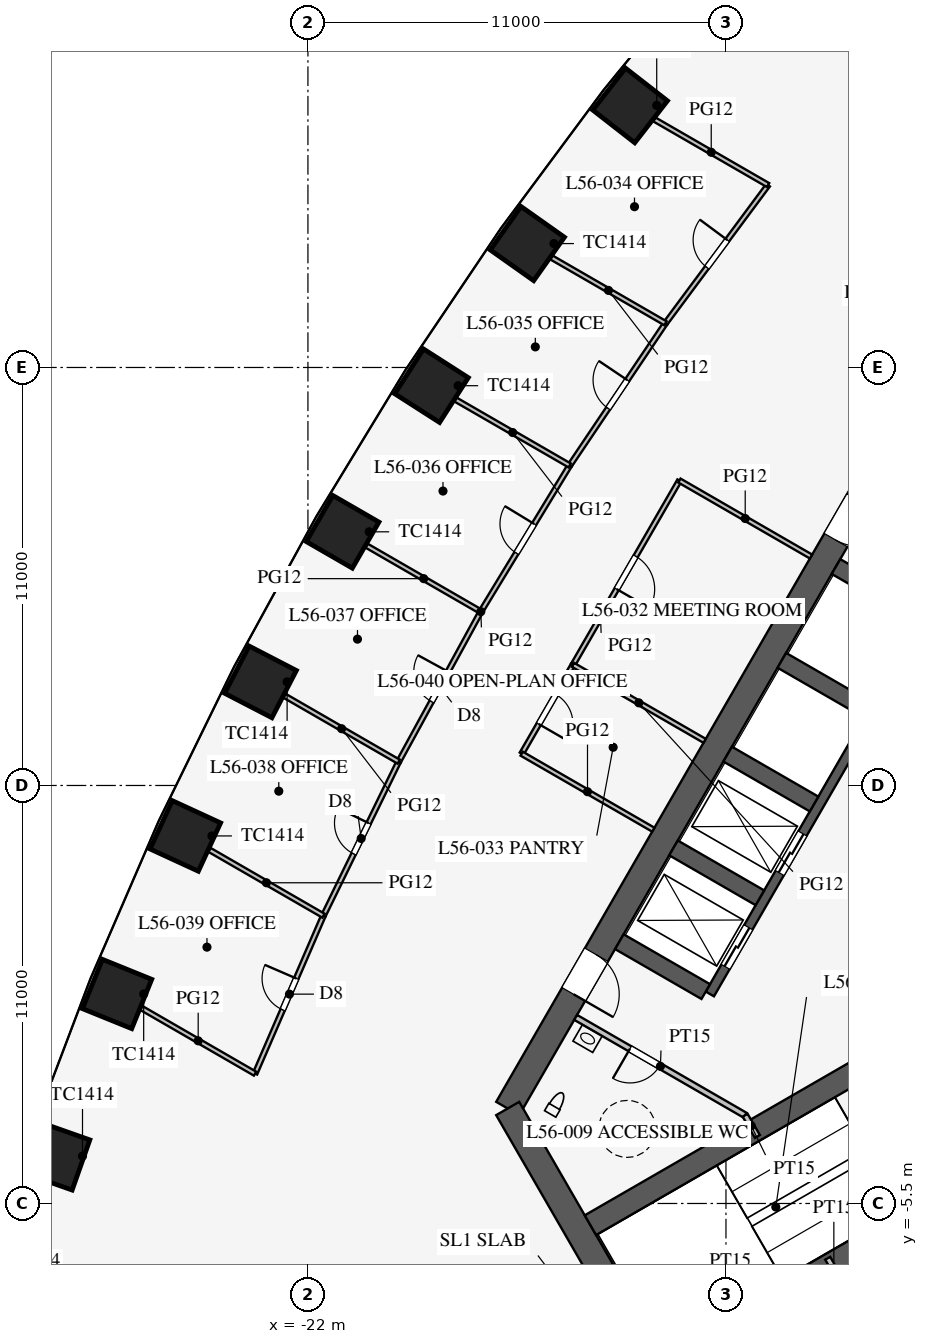
"""IFC4 building model, lengths in metres.
Left out: names, types, materials, properties, quantities, classifications, styles, units other than length and angle.
Written with IfcOpenShell. Run it as: python <this file> out.ifc"""

import sys

from ifc_helpers import new_model, si_unit, direction, frame, frame_2d, origin, origin_2d, place, context, subcontext, project, spatial, rectangle, extrude, element, fill, save


model = new_model("IFC4")
c1 = context("Model", 3, precision=1e-05, world=origin(), true_north=direction((0.0, 1.0)))
c2 = subcontext(c1, "Body", "Model", "MODEL_VIEW")
j1 = project(units=[si_unit("LENGTHUNIT", "METRE"), si_unit("PLANEANGLEUNIT", "RADIAN")], contexts=[c1])
p1 = place(None, origin())
s1 = spatial("IfcSite", under=j1, at=p1, CompositionType="ELEMENT")
p2 = place(p1, origin())
s2 = spatial("IfcBuilding", under=s1, at=p2, CompositionType="ELEMENT")
p3 = place(p2, frame((0.0, 0.0, 244.3)))
s3 = spatial("IfcBuildingStorey", under=s2, at=p3, CompositionType="ELEMENT", Elevation=244.3)
for number, where, z_axis, x_axis in (
    (1, (-13.522, 23.396, 0.0), (0.0, 0.0, 1.0), (-0.615, -0.789, 0.0)),
    (2, (-16.227, 19.761, 0.0), (0.0, 0.0, 1.0), (-0.577, -0.816, 0.0)),
    (3, (-18.748, 16.02, 0.0), (0.0, 0.0, 1.0), (-0.539, -0.842, 0.0)),
    (4, (-21.088, 12.175, 0.0), (0.0, 0.0, 1.0), (-0.5, -0.866, 0.0)),
    (5, (-23.248, 8.226, 0.0), (0.0, 0.0, 1.0), (-0.46, -0.888, 0.0)),
    (6, (-25.227, 4.172, 0.0), (0.0, 0.0, 1.0), (-0.418, -0.908, 0.0)),
    (7, (-27.022, 0.013, 0.0), (0.0, 0.0, 1.0), (-0.376, -0.927, 0.0)),
    (8, (-28.632, -4.254, 0.0), (0.0, 0.0, 1.0), (-0.332, -0.943, 0.0)),
):
    element("IfcColumn", number, at=place(p3, frame(where, z_axis=z_axis, x_axis=x_axis)), inside=s3, PredefinedType="COLUMN", context=c2, shape_type="SweptSolid", body=[
        extrude(rectangle(XDim=1.4, YDim=1.4, at=origin_2d()), origin(), (0.0, 0.0, 1.0), 4.2),
    ])
p4 = place(p3, frame((-5.773, 16.0, 0.0), z_axis=(0.0, 0.0, 1.0), x_axis=(-0.500002442456, -0.866023993627, 0.0)))
e9 = element("IfcWall", 9, at=p4, inside=s3, PredefinedType="SHEAR", context=c2, shape_type="SweptSolid", body=[
    extrude(rectangle(XDim=21.939, YDim=0.7, at=frame_2d((10.97, 0.0))), origin(), (0.0, 0.0, 1.0), 4.2),
])
p5 = place(p4, frame((17.27, 0.0, 0.0)))
e10 = element("IfcOpeningElement", 10, at=p5, cuts=e9, PredefinedType="OPENING", context=c2, shape_type="SweptSolid", body=[
    extrude(rectangle(XDim=1.2, YDim=2.1, at=frame_2d((0.6, 1.05))), frame((0.0, 0.36, 0.0), z_axis=(0.0, -1.0, 0.0), x_axis=(1.0, 0.0, 0.0)), (0.0, 0.0, 1.0), 0.72),
])
p6 = place(p4, frame((3.47, 0.0, 0.0)))
e11 = element("IfcOpeningElement", 11, at=p6, cuts=e9, PredefinedType="OPENING", context=c2, shape_type="SweptSolid", body=[
    extrude(rectangle(XDim=1.2, YDim=2.1, at=frame_2d((0.6, 1.05))), frame((0.0, 0.36, 0.0), z_axis=(0.0, -1.0, 0.0), x_axis=(1.0, 0.0, 0.0)), (0.0, 0.0, 1.0), 0.72),
])
p7 = place(p3, frame((-16.743, -3.0, 0.0), z_axis=(0.0, 0.0, 1.0), x_axis=(0.499995765644, -0.866027848477, 0.0)))
e12 = element("IfcWall", 12, at=p7, inside=s3, PredefinedType="SHEAR", context=c2, shape_type="SweptSolid", body=[
    extrude(rectangle(XDim=11.547, YDim=0.7, at=frame_2d((5.773, 0.0))), origin(), (0.0, 0.0, 1.0), 4.2),
])
p8 = place(p3, frame((-5.724, 9.886, 0.0), z_axis=(0.0, 0.0, 1.0), x_axis=(-0.500001763848, -0.866024385424, 0.0)))
e13 = element("IfcWall", 13, at=p8, inside=s3, PredefinedType="SHEAR", context=c2, shape_type="SweptSolid", body=[
    extrude(rectangle(XDim=11.4, YDim=0.25, at=frame_2d((5.7, 0.0))), origin(), (0.0, 0.0, 1.0), 4.2),
])
p9 = place(p8, frame((6.525, 0.0, 0.0)))
e14 = element("IfcOpeningElement", 14, at=p9, cuts=e13, PredefinedType="OPENING", context=c2, shape_type="SweptSolid", body=[
    extrude(rectangle(XDim=1.2, YDim=2.2, at=frame_2d((0.6, 1.1))), frame((0.0, 0.135, 0.0), z_axis=(0.0, -1.0, 0.0), x_axis=(1.0, 0.0, 0.0)), (0.0, 0.0, 1.0), 0.27),
])
p10 = place(p8, frame((9.375, 0.0, 0.0)))
e15 = element("IfcOpeningElement", 15, at=p10, cuts=e13, PredefinedType="OPENING", context=c2, shape_type="SweptSolid", body=[
    extrude(rectangle(XDim=1.2, YDim=2.2, at=frame_2d((0.6, 1.1))), frame((0.0, 0.135, 0.0), z_axis=(0.0, -1.0, 0.0), x_axis=(1.0, 0.0, 0.0)), (0.0, 0.0, 1.0), 0.27),
])
for number, where, z_axis, x_axis in (
    (16, (-5.832, 9.949, 0.0), (0.0, 0.0, 1.0), (-0.866, 0.5, 0.0)),
    (17, (-7.257, 7.481, 0.0), (0.0, 0.0, 1.0), (-0.866, 0.5, 0.0)),
    (18, (-8.682, 5.012, 0.0), (0.0, 0.0, 1.0), (-0.866, 0.5, 0.0)),
    (19, (-10.107, 2.544, 0.0), (0.0, 0.0, 1.0), (-0.866, 0.5, 0.0)),
    (20, (-11.532, 0.076, 0.0), (0.0, 0.0, 1.0), (-0.866, 0.5, 0.0)),
):
    element("IfcWall", number, at=place(p3, frame(where, z_axis=z_axis, x_axis=x_axis)), inside=s3, PredefinedType="SHEAR", context=c2, shape_type="SweptSolid", body=[
        extrude(rectangle(XDim=2.625, YDim=0.45, at=frame_2d((1.312, 0.0))), origin(), (0.0, 0.0, 1.0), 4.2),
    ])
for number, where, z_axis, x_axis in (
    (21, (-6.663, -1.509, 0.0), (0.0, 0.0, 1.0), (-0.866, -0.5, 0.0)),
    (22, (-4.638, -5.016, 0.0), (0.0, 0.0, 1.0), (-0.866, -0.5, 0.0)),
):
    element("IfcWall", number, at=place(p3, frame(where, z_axis=z_axis, x_axis=x_axis)), inside=s3, PredefinedType="SHEAR", context=c2, shape_type="SweptSolid", body=[
        extrude(rectangle(XDim=9.125, YDim=0.6, at=frame_2d((4.562, 0.0))), origin(), (0.0, 0.0, 1.0), 4.2),
    ])
p11 = place(p3, frame((-10.495, -3.178, 0.0), z_axis=(0.0, 0.0, 1.0), x_axis=(-0.866037967349, 0.499978238636, 0.0)))
e23 = element("IfcWall", 23, at=p11, inside=s3, PredefinedType="PARTITIONING", context=c2, shape_type="SweptSolid", body=[
    extrude(rectangle(XDim=5.15, YDim=0.15, at=frame_2d((2.575, 0.0))), origin(), (0.0, 0.0, 1.0), 4.0),
])
p12 = place(p11, frame((2.6, 0.0, 0.0)))
e24 = element("IfcOpeningElement", 24, at=p12, cuts=e23, PredefinedType="OPENING", context=c2, shape_type="SweptSolid", body=[
    extrude(rectangle(XDim=0.9, YDim=2.1, at=frame_2d((0.45, 1.05))), frame((0.0, 0.085, 0.0), z_axis=(0.0, -1.0, 0.0), x_axis=(1.0, 0.0, 0.0)), (0.0, 0.0, 1.0), 0.17),
])
for number, where, z_axis, x_axis in (
    (25, (-10.495, -3.178, 0.0), (0.0, 0.0, 1.0), (0.5, -0.866, 0.0)),
    (26, (-8.0, -7.5, 0.0), (0.0, 0.0, 1.0), (-0.5, 0.866, 0.0)),
):
    element("IfcWall", number, at=place(p3, frame(where, z_axis=z_axis, x_axis=x_axis)), inside=s3, PredefinedType="PARTITIONING", context=c2, shape_type="SweptSolid", body=[
        extrude(rectangle(XDim=0.645, YDim=0.15, at=frame_2d((0.323, 0.0))), origin(), (0.0, 0.0, 1.0), 4.0),
    ])
p13 = place(p3, frame((-15.026, 8.675, 0.0), z_axis=(0.0, 0.0, 1.0), x_axis=(-0.4999416173, -0.866059108428, 0.0)))
e27 = element("IfcWall", 27, at=p13, inside=s3, PredefinedType="PARTITIONING", context=c2, shape_type="SweptSolid", body=[
    extrude(rectangle(XDim=2.7, YDim=0.12, at=frame_2d((1.35, 0.0))), origin(), (0.0, 0.0, 1.0), 2.9),
])
p14 = place(p13, frame((0.9, 0.0, 0.15)))
e28 = element("IfcOpeningElement", 28, at=p14, cuts=e27, PredefinedType="OPENING", context=c2, shape_type="SweptSolid", body=[
    extrude(rectangle(XDim=0.9, YDim=2.1, at=frame_2d((0.45, 1.05))), frame((0.0, 0.07, 0.0), z_axis=(0.0, -1.0, 0.0), x_axis=(1.0, 0.0, 0.0)), (0.0, 0.0, 1.0), 0.14),
])
p15 = place(p3, frame((-12.226, 13.525, 0.0), z_axis=(0.0, 0.0, 1.0), x_axis=(-0.500016814911, -0.866015695474, 0.0)))
e29 = element("IfcWall", 29, at=p15, inside=s3, PredefinedType="PARTITIONING", context=c2, shape_type="SweptSolid", body=[
    extrude(rectangle(XDim=5.6, YDim=0.12, at=frame_2d((2.8, 0.0))), origin(), (0.0, 0.0, 1.0), 2.9),
])
p16 = place(p15, frame((2.3, 0.0, 0.15)))
e30 = element("IfcOpeningElement", 30, at=p16, cuts=e29, PredefinedType="OPENING", context=c2, shape_type="SweptSolid", body=[
    extrude(rectangle(XDim=1.0, YDim=2.1, at=frame_2d((0.5, 1.05))), frame((0.0, 0.07, 0.0), z_axis=(0.0, -1.0, 0.0), x_axis=(1.0, 0.0, 0.0)), (0.0, 0.0, 1.0), 0.14),
])
for number, where, z_axis, x_axis in (
    (31, (-12.911, 4.337, 0.0), (0.0, 0.0, 1.0), (-0.866, 0.5, 0.0)),
    (32, (-11.562, 6.675, 0.0), (0.0, 0.0, 1.0), (-0.866, 0.5, 0.0)),
    (33, (-8.761, 11.525, 0.0), (0.0, 0.0, 1.0), (-0.866, 0.5, 0.0)),
):
    element("IfcWall", number, at=place(p3, frame(where, z_axis=z_axis, x_axis=x_axis)), inside=s3, PredefinedType="PARTITIONING", context=c2, shape_type="SweptSolid", body=[
        extrude(rectangle(XDim=4.0, YDim=0.12, at=frame_2d((2.0, 0.0))), origin(), (0.0, 0.0, 1.0), 2.9),
    ])
p17 = place(p3, frame((-17.451, 10.075, 0.0), z_axis=(0.0, 0.0, 1.0), x_axis=(-0.479949984371, -0.877295852322, 0.0)))
e34 = element("IfcWall", 34, at=p17, inside=s3, PredefinedType="PARTITIONING", context=c2, shape_type="SweptSolid", body=[
    extrude(rectangle(XDim=4.501, YDim=0.12, at=frame_2d((2.25, 0.0))), origin(), (0.0, 0.0, 1.0), 2.9),
])
p18 = place(p17, frame((1.8, 0.0, 0.15)))
e35 = element("IfcOpeningElement", 35, at=p18, cuts=e34, PredefinedType="OPENING", context=c2, shape_type="SweptSolid", body=[
    extrude(rectangle(XDim=0.9, YDim=2.1, at=frame_2d((0.45, 1.05))), frame((0.0, 0.07, 0.0), z_axis=(0.0, -1.0, 0.0), x_axis=(1.0, 0.0, 0.0)), (0.0, 0.0, 1.0), 0.14),
])
p19 = place(p3, frame((-19.611, 6.126, 0.0), z_axis=(0.0, 0.0, 1.0), x_axis=(-0.439163535873, -0.898407139753, 0.0)))
e36 = element("IfcWall", 36, at=p19, inside=s3, PredefinedType="PARTITIONING", context=c2, shape_type="SweptSolid", body=[
    extrude(rectangle(XDim=4.511, YDim=0.12, at=frame_2d((2.255, 0.0))), origin(), (0.0, 0.0, 1.0), 2.9),
])
p20 = place(p19, frame((1.8, 0.0, 0.15)))
e37 = element("IfcOpeningElement", 37, at=p20, cuts=e36, PredefinedType="OPENING", context=c2, shape_type="SweptSolid", body=[
    extrude(rectangle(XDim=0.9, YDim=2.1, at=frame_2d((0.45, 1.05))), frame((0.0, 0.07, 0.0), z_axis=(0.0, -1.0, 0.0), x_axis=(1.0, 0.0, 0.0)), (0.0, 0.0, 1.0), 0.14),
])
p21 = place(p3, frame((-21.592, 2.074, 0.0), z_axis=(0.0, 0.0, 1.0), x_axis=(-0.397208101111, -0.917728567939, 0.0)))
e38 = element("IfcWall", 38, at=p21, inside=s3, PredefinedType="PARTITIONING", context=c2, shape_type="SweptSolid", body=[
    extrude(rectangle(XDim=4.53, YDim=0.12, at=frame_2d((2.265, 0.0))), origin(), (0.0, 0.0, 1.0), 2.9),
])
p22 = place(p21, frame((1.8, 0.0, 0.15)))
e39 = element("IfcOpeningElement", 39, at=p22, cuts=e38, PredefinedType="OPENING", context=c2, shape_type="SweptSolid", body=[
    extrude(rectangle(XDim=0.9, YDim=2.1, at=frame_2d((0.45, 1.05))), frame((0.0, 0.07, 0.0), z_axis=(0.0, -1.0, 0.0), x_axis=(1.0, 0.0, 0.0)), (0.0, 0.0, 1.0), 0.14),
])
p23 = place(p3, frame((-9.892, 21.299, 0.0), z_axis=(0.0, 0.0, 1.0), x_axis=(-0.596173167565, -0.802855873912, 0.0)))
e40 = element("IfcWall", 40, at=p23, inside=s3, PredefinedType="PARTITIONING", context=c2, shape_type="SweptSolid", body=[
    extrude(rectangle(XDim=4.53, YDim=0.12, at=frame_2d((2.265, 0.0))), origin(), (0.0, 0.0, 1.0), 2.9),
])
p24 = place(p23, frame((1.8, 0.0, 0.15)))
e41 = element("IfcOpeningElement", 41, at=p24, cuts=e40, PredefinedType="OPENING", context=c2, shape_type="SweptSolid", body=[
    extrude(rectangle(XDim=0.9, YDim=2.1, at=frame_2d((0.45, 1.05))), frame((0.0, 0.07, 0.0), z_axis=(0.0, -1.0, 0.0), x_axis=(1.0, 0.0, 0.0)), (0.0, 0.0, 1.0), 0.14),
])
p25 = place(p3, frame((-15.111, 13.921, 0.0), z_axis=(0.0, 0.0, 1.0), x_axis=(-0.519790350351, -0.85429385558, 0.0)))
e42 = element("IfcWall", 42, at=p25, inside=s3, PredefinedType="PARTITIONING", context=c2, shape_type="SweptSolid", body=[
    extrude(rectangle(XDim=4.501, YDim=0.12, at=frame_2d((2.25, 0.0))), origin(), (0.0, 0.0, 1.0), 2.9),
])
p26 = place(p25, frame((1.8, 0.0, 0.15)))
e43 = element("IfcOpeningElement", 43, at=p26, cuts=e42, PredefinedType="OPENING", context=c2, shape_type="SweptSolid", body=[
    extrude(rectangle(XDim=0.9, YDim=2.1, at=frame_2d((0.45, 1.05))), frame((0.0, 0.07, 0.0), z_axis=(0.0, -1.0, 0.0), x_axis=(1.0, 0.0, 0.0)), (0.0, 0.0, 1.0), 0.14),
])
p27 = place(p3, frame((-12.592, 17.662, 0.0), z_axis=(0.0, 0.0, 1.0), x_axis=(-0.558466624917, -0.829526991034, 0.0)))
e44 = element("IfcWall", 44, at=p27, inside=s3, PredefinedType="PARTITIONING", context=c2, shape_type="SweptSolid", body=[
    extrude(rectangle(XDim=4.511, YDim=0.12, at=frame_2d((2.255, 0.0))), origin(), (0.0, 0.0, 1.0), 2.9),
])
p28 = place(p27, frame((1.8, 0.0, 0.15)))
e45 = element("IfcOpeningElement", 45, at=p28, cuts=e44, PredefinedType="OPENING", context=c2, shape_type="SweptSolid", body=[
    extrude(rectangle(XDim=0.9, YDim=2.1, at=frame_2d((0.45, 1.05))), frame((0.0, 0.07, 0.0), z_axis=(0.0, -1.0, 0.0), x_axis=(1.0, 0.0, 0.0)), (0.0, 0.0, 1.0), 0.14),
])
p29 = place(p3, frame((-17.451, 10.075, 0.0), z_axis=(0.0, 0.0, 1.0), x_axis=(-0.866043818878, 0.499968102766, 0.0)))
e46 = element("IfcWall", 46, at=p29, inside=s3, PredefinedType="PARTITIONING", context=c2, shape_type="SweptSolid", body=[
    extrude(rectangle(XDim=3.47, YDim=0.12, at=frame_2d((1.735, 0.0))), origin(), (0.0, 0.0, 1.0), 2.9),
])
p30 = place(p3, frame((-23.392, -2.083, 0.0), z_axis=(0.0, 0.0, 1.0), x_axis=(-0.866043217385, 0.49996914467, 0.0)))
e47 = element("IfcWall", 47, at=p30, inside=s3, PredefinedType="PARTITIONING", context=c2, shape_type="SweptSolid", body=[
    extrude(rectangle(XDim=3.455, YDim=0.12, at=frame_2d((1.728, 0.0))), origin(), (0.0, 0.0, 1.0), 2.8),
])
p31 = place(p3, frame((-19.611, 6.126, 0.0), z_axis=(0.0, 0.0, 1.0), x_axis=(-0.866047277861, 0.499962111074, 0.0)))
e48 = element("IfcWall", 48, at=p31, inside=s3, PredefinedType="PARTITIONING", context=c2, shape_type="SweptSolid", body=[
    extrude(rectangle(XDim=3.469, YDim=0.12, at=frame_2d((1.734, 0.0))), origin(), (0.0, 0.0, 1.0), 2.9),
])
p32 = place(p3, frame((-21.592, 2.074, 0.0), z_axis=(0.0, 0.0, 1.0), x_axis=(-0.866035335986, 0.499982796528, 0.0)))
e49 = element("IfcWall", 49, at=p32, inside=s3, PredefinedType="PARTITIONING", context=c2, shape_type="SweptSolid", body=[
    extrude(rectangle(XDim=3.463, YDim=0.12, at=frame_2d((1.732, 0.0))), origin(), (0.0, 0.0, 1.0), 2.9),
])
p33 = place(p3, frame((-9.892, 21.299, 0.0), z_axis=(0.0, 0.0, 1.0), x_axis=(-0.866012622712, 0.500022136814, 0.0)))
e50 = element("IfcWall", 50, at=p33, inside=s3, PredefinedType="PARTITIONING", context=c2, shape_type="SweptSolid", body=[
    extrude(rectangle(XDim=3.455, YDim=0.12, at=frame_2d((1.728, 0.0))), origin(), (0.0, 0.0, 1.0), 2.8),
])
p34 = place(p3, frame((-15.111, 13.921, 0.0), z_axis=(0.0, 0.0, 1.0), x_axis=(-0.866016800201, 0.500014901547, 0.0)))
e51 = element("IfcWall", 51, at=p34, inside=s3, PredefinedType="PARTITIONING", context=c2, shape_type="SweptSolid", body=[
    extrude(rectangle(XDim=3.469, YDim=0.12, at=frame_2d((1.734, 0.0))), origin(), (0.0, 0.0, 1.0), 2.9),
])
p35 = place(p3, frame((-12.592, 17.662, 0.0), z_axis=(0.0, 0.0, 1.0), x_axis=(-0.866004813252, 0.500035662153, 0.0)))
e52 = element("IfcWall", 52, at=p35, inside=s3, PredefinedType="PARTITIONING", context=c2, shape_type="SweptSolid", body=[
    extrude(rectangle(XDim=3.464, YDim=0.12, at=frame_2d((1.732, 0.0))), origin(), (0.0, 0.0, 1.0), 2.9),
])
p36 = place(p12, origin())
e53 = element("IfcDoor", 53, at=p36, inside=s3, OperationType="SINGLE_SWING_RIGHT", PredefinedType="DOOR", context=c2, shape_type="SweptSolid", body=[
    extrude(rectangle(XDim=0.9, YDim=2.1, at=frame_2d((0.45, 1.05))), frame((0.0, 0.025, 0.0), z_axis=(0.0, -1.0, 0.0), x_axis=(1.0, 0.0, 0.0)), (0.0, 0.0, 1.0), 0.05),
])
fill(e24, e53)
p37 = place(p5, origin())
e54 = element("IfcDoor", 54, at=p37, inside=s3, OperationType="SINGLE_SWING_RIGHT", PredefinedType="DOOR", context=c2, shape_type="SweptSolid", body=[
    extrude(rectangle(XDim=1.2, YDim=2.1, at=frame_2d((0.6, 1.05))), frame((0.0, 0.025, 0.0), z_axis=(0.0, -1.0, 0.0), x_axis=(1.0, 0.0, 0.0)), (0.0, 0.0, 1.0), 0.05),
])
fill(e10, e54)
p38 = place(p6, origin())
e55 = element("IfcDoor", 55, at=p38, inside=s3, OperationType="SINGLE_SWING_LEFT", PredefinedType="DOOR", context=c2, shape_type="SweptSolid", body=[
    extrude(rectangle(XDim=1.2, YDim=2.1, at=frame_2d((0.6, 1.05))), frame((0.0, 0.025, 0.0), z_axis=(0.0, -1.0, 0.0), x_axis=(1.0, 0.0, 0.0)), (0.0, 0.0, 1.0), 0.05),
])
fill(e11, e55)
p39 = place(p16, origin())
e56 = element("IfcDoor", 56, at=p39, inside=s3, OperationType="SINGLE_SWING_RIGHT", PredefinedType="DOOR", context=c2, shape_type="SweptSolid", body=[
    extrude(rectangle(XDim=1.0, YDim=2.1, at=frame_2d((0.5, 1.05))), frame((0.0, 0.025, 0.0), z_axis=(0.0, -1.0, 0.0), x_axis=(1.0, 0.0, 0.0)), (0.0, 0.0, 1.0), 0.05),
])
fill(e30, e56)
p40 = place(p14, origin())
e57 = element("IfcDoor", 57, at=p40, inside=s3, OperationType="SINGLE_SWING_RIGHT", PredefinedType="DOOR", context=c2, shape_type="SweptSolid", body=[
    extrude(rectangle(XDim=0.9, YDim=2.1, at=frame_2d((0.45, 1.05))), frame((0.0, 0.025, 0.0), z_axis=(0.0, -1.0, 0.0), x_axis=(1.0, 0.0, 0.0)), (0.0, 0.0, 1.0), 0.05),
])
fill(e28, e57)
p41 = place(p24, frame((0.9, 0.0, 0.0), z_axis=(0.0, 0.0, 1.0), x_axis=(-1.0, 0.0, 0.0)))
e58 = element("IfcDoor", 58, at=p41, inside=s3, OperationType="SINGLE_SWING_RIGHT", PredefinedType="DOOR", context=c2, shape_type="SweptSolid", body=[
    extrude(rectangle(XDim=0.9, YDim=2.1, at=frame_2d((0.45, 1.05))), frame((0.0, 0.025, 0.0), z_axis=(0.0, -1.0, 0.0), x_axis=(1.0, 0.0, 0.0)), (0.0, 0.0, 1.0), 0.05),
])
fill(e41, e58)
p42 = place(p28, frame((0.9, 0.0, 0.0), z_axis=(0.0, 0.0, 1.0), x_axis=(-1.0, 0.0, 0.0)))
e59 = element("IfcDoor", 59, at=p42, inside=s3, OperationType="SINGLE_SWING_RIGHT", PredefinedType="DOOR", context=c2, shape_type="SweptSolid", body=[
    extrude(rectangle(XDim=0.9, YDim=2.1, at=frame_2d((0.45, 1.05))), frame((0.0, 0.025, 0.0), z_axis=(0.0, -1.0, 0.0), x_axis=(1.0, 0.0, 0.0)), (0.0, 0.0, 1.0), 0.05),
])
fill(e45, e59)
p43 = place(p26, frame((0.9, 0.0, 0.0), z_axis=(0.0, 0.0, 1.0), x_axis=(-1.0, 0.0, 0.0)))
e60 = element("IfcDoor", 60, at=p43, inside=s3, OperationType="SINGLE_SWING_RIGHT", PredefinedType="DOOR", context=c2, shape_type="SweptSolid", body=[
    extrude(rectangle(XDim=0.9, YDim=2.1, at=frame_2d((0.45, 1.05))), frame((0.0, 0.025, 0.0), z_axis=(0.0, -1.0, 0.0), x_axis=(1.0, 0.0, 0.0)), (0.0, 0.0, 1.0), 0.05),
])
fill(e43, e60)
p44 = place(p18, frame((0.9, 0.0, 0.0), z_axis=(0.0, 0.0, 1.0), x_axis=(-1.0, 0.0, 0.0)))
e61 = element("IfcDoor", 61, at=p44, inside=s3, OperationType="SINGLE_SWING_RIGHT", PredefinedType="DOOR", context=c2, shape_type="SweptSolid", body=[
    extrude(rectangle(XDim=0.9, YDim=2.1, at=frame_2d((0.45, 1.05))), frame((0.0, 0.025, 0.0), z_axis=(0.0, -1.0, 0.0), x_axis=(1.0, 0.0, 0.0)), (0.0, 0.0, 1.0), 0.05),
])
fill(e35, e61)
p45 = place(p20, frame((0.9, 0.0, 0.0), z_axis=(0.0, 0.0, 1.0), x_axis=(-1.0, 0.0, 0.0)))
e62 = element("IfcDoor", 62, at=p45, inside=s3, OperationType="SINGLE_SWING_RIGHT", PredefinedType="DOOR", context=c2, shape_type="SweptSolid", body=[
    extrude(rectangle(XDim=0.9, YDim=2.1, at=frame_2d((0.45, 1.05))), frame((0.0, 0.025, 0.0), z_axis=(0.0, -1.0, 0.0), x_axis=(1.0, 0.0, 0.0)), (0.0, 0.0, 1.0), 0.05),
])
fill(e37, e62)
p46 = place(p22, frame((0.9, 0.0, 0.0), z_axis=(0.0, 0.0, 1.0), x_axis=(-1.0, 0.0, 0.0)))
e63 = element("IfcDoor", 63, at=p46, inside=s3, OperationType="SINGLE_SWING_RIGHT", PredefinedType="DOOR", context=c2, shape_type="SweptSolid", body=[
    extrude(rectangle(XDim=0.9, YDim=2.1, at=frame_2d((0.45, 1.05))), frame((0.0, 0.025, 0.0), z_axis=(0.0, -1.0, 0.0), x_axis=(1.0, 0.0, 0.0)), (0.0, 0.0, 1.0), 0.05),
])
fill(e39, e63)
p47 = place(p9, origin())
e64 = element("IfcDoor", 64, at=p47, inside=s3, OperationType="DOUBLE_DOOR_SLIDING", PredefinedType="DOOR", context=c2, shape_type="SweptSolid", body=[
    extrude(rectangle(XDim=1.2, YDim=2.2, at=frame_2d((0.6, 1.1))), frame((0.0, 0.025, 0.0), z_axis=(0.0, -1.0, 0.0), x_axis=(1.0, 0.0, 0.0)), (0.0, 0.0, 1.0), 0.05),
])
fill(e14, e64)
p48 = place(p10, origin())
e65 = element("IfcDoor", 65, at=p48, inside=s3, OperationType="DOUBLE_DOOR_SLIDING", PredefinedType="DOOR", context=c2, shape_type="SweptSolid", body=[
    extrude(rectangle(XDim=1.2, YDim=2.2, at=frame_2d((0.6, 1.1))), frame((0.0, 0.025, 0.0), z_axis=(0.0, -1.0, 0.0), x_axis=(1.0, 0.0, 0.0)), (0.0, 0.0, 1.0), 0.05),
])
fill(e15, e65)
save(model, sys.argv[1])
